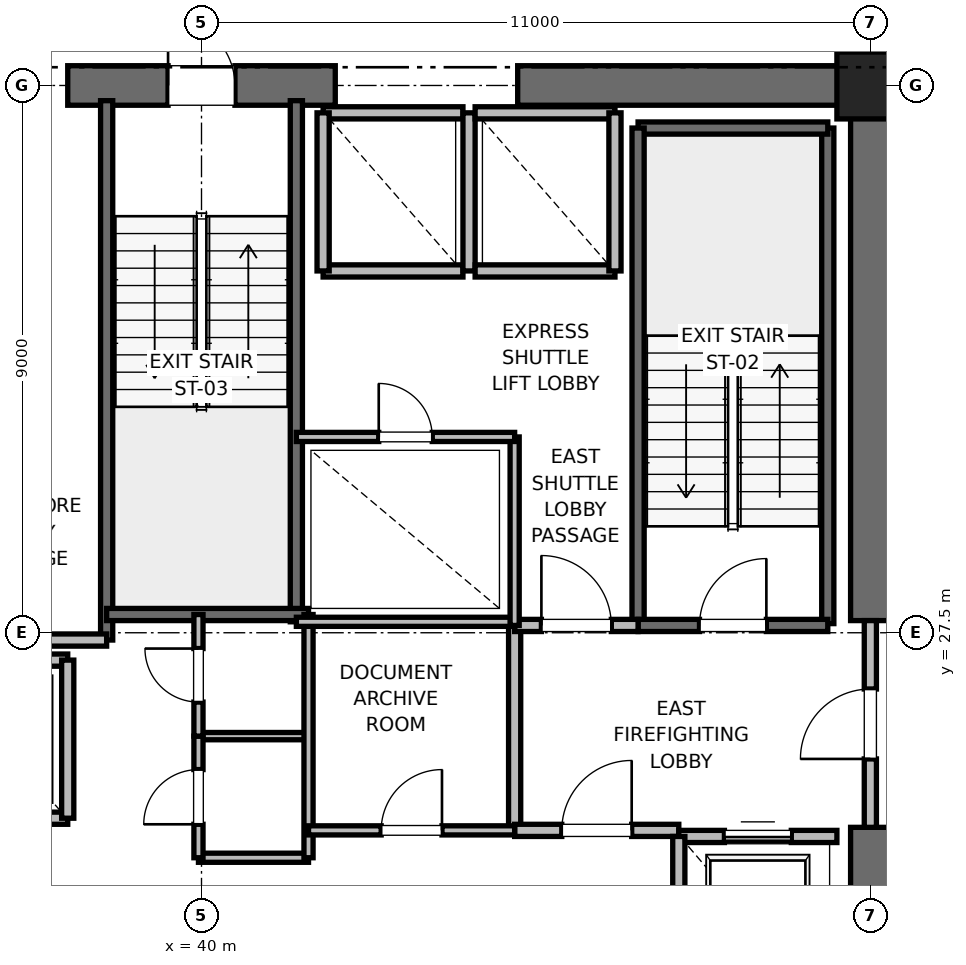
"""IFC4 building model, lengths in metres.
Left out: names, types, materials, properties, quantities, classifications, styles, units other than length and angle.
Written with IfcOpenShell. Run it as: python <this file> out.ifc"""

import sys

from ifc_helpers import new_model, si_unit, direction, frame, frame_2d, origin, origin_2d, place, context, subcontext, project, spatial, rectangle, extrude, element, fill, save


model = new_model("IFC4")
c1 = context("Model", 3, precision=1e-05, world=origin(), true_north=direction((0.0, 1.0)))
c2 = subcontext(c1, "Body", "Model", "MODEL_VIEW")
j1 = project(units=[si_unit("LENGTHUNIT", "METRE"), si_unit("PLANEANGLEUNIT", "RADIAN")], contexts=[c1])
p1 = place(None, origin())
s1 = spatial("IfcSite", under=j1, at=p1, CompositionType="ELEMENT")
p2 = place(p1, origin())
s2 = spatial("IfcBuilding", under=s1, at=p2, CompositionType="ELEMENT")
p3 = place(p2, frame((0.0, 0.0, 79.6)))
s3 = spatial("IfcBuildingStorey", under=s2, at=p3, CompositionType="ELEMENT", Elevation=79.6)
p4 = place(p3, frame((51.0, 36.5, 0.0), z_axis=(0.0, 0.0, 1.0), x_axis=(1.0, 0.0, 0.0)))
e1 = element("IfcColumn", 1, at=p4, inside=s3, PredefinedType="PILASTER", context=c2, shape_type="SweptSolid", body=[
    extrude(rectangle(XDim=1.1, YDim=1.1, at=origin_2d()), origin(), (0.0, 0.0, 1.0), 4.0),
])
p5 = place(p3, frame((37.8, 36.5, 0.0), z_axis=(0.0, 0.0, 1.0), x_axis=(1.0, 0.0, 0.0)))
e2 = element("IfcWall", 2, at=p5, inside=s3, PredefinedType="SHEAR", context=c2, shape_type="SweptSolid", body=[
    extrude(rectangle(XDim=4.4, YDim=0.65, at=frame_2d((2.2, 0.0))), origin(), (0.0, 0.0, 1.0), 3.76),
])
p6 = place(p5, frame((1.65, 0.0, 0.0)))
e3 = element("IfcOpeningElement", 3, at=p6, cuts=e2, PredefinedType="OPENING", context=c2, shape_type="SweptSolid", body=[
    extrude(rectangle(XDim=1.1, YDim=2.15, at=frame_2d((0.55, 1.075))), frame((0.0, 0.325, 0.0), z_axis=(0.0, -1.0, 0.0), x_axis=(1.0, 0.0, 0.0)), (0.0, 0.0, 1.0), 0.65),
])
for number, where, z_axis, x_axis in (
    (4, (45.2, 36.5, 0.0), (0.0, 0.0, 1.0), (1.0, 0.0, 0.0)),
    (5, (51.0, 18.5, 0.0), (0.0, 0.0, 1.0), (0.0, 1.0, 0.0)),
):
    element("IfcWall", number, at=place(p3, frame(where, z_axis=z_axis, x_axis=x_axis)), inside=s3, PredefinedType="SHEAR", context=c2, shape_type="SweptSolid", body=[
        extrude(rectangle(XDim=5.8, YDim=0.65, at=frame_2d((2.9, 0.0))), origin(), (0.0, 0.0, 1.0), 3.76),
    ])
p7 = place(p3, frame((51.0, 27.7, 0.0), z_axis=(0.0, 0.0, 1.0), x_axis=(0.0, 1.0, 0.0)))
e6 = element("IfcWall", 6, at=p7, inside=s3, PredefinedType="SHEAR", context=c2, shape_type="SweptSolid", body=[
    extrude(rectangle(XDim=8.8, YDim=0.65, at=frame_2d((4.4, 0.0))), origin(), (0.0, 0.0, 1.0), 3.76),
])
p8 = place(p3, frame((50.3, 27.65, 0.0), z_axis=(0.0, 0.0, 1.0), x_axis=(0.0, 1.0, 0.0)))
e7 = element("IfcWall", 7, at=p8, inside=s3, PredefinedType="SOLIDWALL", context=c2, shape_type="SweptSolid", body=[
    extrude(rectangle(XDim=8.15, YDim=0.2, at=frame_2d((4.075, 0.0))), origin(), (0.0, 0.0, 1.0), 3.76),
])
p9 = place(p3, frame((47.18, 35.8, 0.0), z_axis=(0.0, 0.0, 1.0), x_axis=(1.0, 0.0, 0.0)))
e8 = element("IfcWall", 8, at=p9, inside=s3, PredefinedType="SOLIDWALL", context=c2, shape_type="SweptSolid", body=[
    extrude(rectangle(XDim=3.12, YDim=0.2, at=frame_2d((1.56, 0.0))), origin(), (0.0, 0.0, 1.0), 3.76),
])
p10 = place(p3, frame((47.18, 27.62, 0.0), z_axis=(0.0, 0.0, 1.0), x_axis=(0.0, 1.0, 0.0)))
e9 = element("IfcWall", 9, at=p10, inside=s3, PredefinedType="SOLIDWALL", context=c2, shape_type="SweptSolid", body=[
    extrude(rectangle(XDim=8.18, YDim=0.2, at=frame_2d((4.09, 0.0))), origin(), (0.0, 0.0, 1.0), 3.76),
])
p11 = place(p3, frame((47.18, 27.62, 0.0), z_axis=(0.0, 0.0, 1.0), x_axis=(1.0, 0.0, 0.0)))
e10 = element("IfcWall", 10, at=p11, inside=s3, PredefinedType="SOLIDWALL", context=c2, shape_type="SweptSolid", body=[
    extrude(rectangle(XDim=3.12, YDim=0.2, at=frame_2d((1.56, 0.0))), origin(), (0.0, 0.0, 1.0), 3.76),
])
p12 = place(p11, frame((1.01, 0.0, 0.0)))
e11 = element("IfcOpeningElement", 11, at=p12, cuts=e10, PredefinedType="OPENING", context=c2, shape_type="SweptSolid", body=[
    extrude(rectangle(XDim=1.1, YDim=2.15, at=frame_2d((0.55, 1.075))), frame((0.0, 0.1, 0.0), z_axis=(0.0, -1.0, 0.0), x_axis=(1.0, 0.0, 0.0)), (0.0, 0.0, 1.0), 0.2),
])
p13 = place(p3, frame((38.44, 27.38, 0.0), z_axis=(0.0, 0.0, 1.0), x_axis=(0.0, 1.0, 0.0)))
e12 = element("IfcWall", 12, at=p13, inside=s3, PredefinedType="SOLIDWALL", context=c2, shape_type="SweptSolid", body=[
    extrude(rectangle(XDim=8.87, YDim=0.2, at=frame_2d((4.435, 0.0))), origin(), (0.0, 0.0, 1.0), 3.76),
])
p14 = place(p3, frame((41.56, 27.68, 0.0), z_axis=(0.0, 0.0, 1.0), x_axis=(0.0, 1.0, 0.0)))
e13 = element("IfcWall", 13, at=p14, inside=s3, PredefinedType="SOLIDWALL", context=c2, shape_type="SweptSolid", body=[
    extrude(rectangle(XDim=8.57, YDim=0.2, at=frame_2d((4.285, 0.0))), origin(), (0.0, 0.0, 1.0), 3.76),
])
p15 = place(p3, frame((38.44, 27.8, 0.0), z_axis=(0.0, 0.0, 1.0), x_axis=(1.0, 0.0, 0.0)))
e14 = element("IfcWall", 14, at=p15, inside=s3, PredefinedType="SOLIDWALL", context=c2, shape_type="SweptSolid", body=[
    extrude(rectangle(XDim=3.32, YDim=0.2, at=frame_2d((1.66, 0.0))), origin(), (0.0, 0.0, 1.0), 3.76),
])
p16 = place(p3, frame((32.82, 27.38, 0.0), z_axis=(0.0, 0.0, 1.0), x_axis=(1.0, 0.0, 0.0)))
e15 = element("IfcWall", 15, at=p16, inside=s3, PredefinedType="PARTITIONING", context=c2, shape_type="SweptSolid", body=[
    extrude(rectangle(XDim=5.62, YDim=0.2, at=frame_2d((2.81, 0.0))), origin(), (0.0, 0.0, 1.0), 3.76),
])
p17 = place(p3, frame((45.15, 24.25, 0.0), z_axis=(0.0, 0.0, 1.0), x_axis=(0.0, 1.0, 0.0)))
e16 = element("IfcWall", 16, at=p17, inside=s3, PredefinedType="PARTITIONING", context=c2, shape_type="SweptSolid", body=[
    extrude(rectangle(XDim=3.37, YDim=0.2, at=frame_2d((1.685, 0.0))), origin(), (0.0, 0.0, 1.0), 3.76),
])
p18 = place(p3, frame((45.15, 24.25, 0.0), z_axis=(0.0, 0.0, 1.0), x_axis=(1.0, 0.0, 0.0)))
e17 = element("IfcWall", 17, at=p18, inside=s3, PredefinedType="PARTITIONING", context=c2, shape_type="SweptSolid", body=[
    extrude(rectangle(XDim=2.7, YDim=0.2, at=frame_2d((1.35, 0.0))), origin(), (0.0, 0.0, 1.0), 3.76),
])
p19 = place(p18, frame((0.775, 0.0, 0.0)))
e18 = element("IfcOpeningElement", 18, at=p19, cuts=e17, PredefinedType="OPENING", context=c2, shape_type="SweptSolid", body=[
    extrude(rectangle(XDim=1.15, YDim=2.2, at=frame_2d((0.575, 1.1))), frame((0.0, 0.1, 0.0), z_axis=(0.0, -1.0, 0.0), x_axis=(1.0, 0.0, 0.0)), (0.0, 0.0, 1.0), 0.2),
])
p20 = place(p3, frame((45.15, 27.62, 0.0), z_axis=(0.0, 0.0, 1.0), x_axis=(1.0, 0.0, 0.0)))
e19 = element("IfcWall", 19, at=p20, inside=s3, PredefinedType="PARTITIONING", context=c2, shape_type="SweptSolid", body=[
    extrude(rectangle(XDim=2.03, YDim=0.2, at=frame_2d((1.015, 0.0))), origin(), (0.0, 0.0, 1.0), 3.76),
])
p21 = place(p20, frame((0.44, 0.0, 0.0)))
e20 = element("IfcOpeningElement", 20, at=p21, cuts=e19, PredefinedType="OPENING", context=c2, shape_type="SweptSolid", body=[
    extrude(rectangle(XDim=1.15, YDim=2.2, at=frame_2d((0.575, 1.1))), frame((0.0, 0.1, 0.0), z_axis=(0.0, -1.0, 0.0), x_axis=(1.0, 0.0, 0.0)), (0.0, 0.0, 1.0), 0.2),
])
p22 = place(p3, frame((51.0, 24.3, 0.0), z_axis=(0.0, 0.0, 1.0), x_axis=(0.0, 1.0, 0.0)))
e21 = element("IfcWall", 21, at=p22, inside=s3, PredefinedType="PARTITIONING", context=c2, shape_type="SweptSolid", body=[
    extrude(rectangle(XDim=3.4, YDim=0.2, at=frame_2d((1.7, 0.0))), origin(), (0.0, 0.0, 1.0), 2.54),
])
p23 = place(p22, frame((1.125, 0.0, 0.0)))
e22 = element("IfcOpeningElement", 22, at=p23, cuts=e21, PredefinedType="OPENING", context=c2, shape_type="SweptSolid", body=[
    extrude(rectangle(XDim=1.15, YDim=2.2, at=frame_2d((0.575, 1.1))), frame((0.0, 0.1, 0.0), z_axis=(0.0, -1.0, 0.0), x_axis=(1.0, 0.0, 0.0)), (0.0, 0.0, 1.0), 0.2),
])
p24 = place(p3, frame((50.45, 24.15, 0.0), z_axis=(0.0, 0.0, 1.0), x_axis=(-1.0, 0.0, 0.0)))
e23 = element("IfcWall", 23, at=p24, inside=s3, PredefinedType="SOLIDWALL", context=c2, shape_type="SweptSolid", body=[
    extrude(rectangle(XDim=2.6, YDim=0.2, at=frame_2d((1.3, 0.0))), origin(), (0.0, 0.0, 1.0), 2.54),
])
p25 = place(p24, frame((0.75, 0.0, 0.0)))
e24 = element("IfcOpeningElement", 24, at=p25, cuts=e23, PredefinedType="OPENING", context=c2, shape_type="SweptSolid", body=[
    extrude(rectangle(XDim=1.1, YDim=2.2, at=frame_2d((0.55, 1.1))), frame((0.0, 0.1, 0.0), z_axis=(0.0, -1.0, 0.0), x_axis=(1.0, 0.0, 0.0)), (0.0, 0.0, 1.0), 0.2),
])
p26 = place(p3, frame((47.85, 24.15, 0.0), z_axis=(0.0, 0.0, 1.0), x_axis=(0.0, -1.0, 0.0)))
e25 = element("IfcWall", 25, at=p26, inside=s3, PredefinedType="SOLIDWALL", context=c2, shape_type="SweptSolid", body=[
    extrude(rectangle(XDim=3.0, YDim=0.2, at=frame_2d((1.5, 0.0))), origin(), (0.0, 0.0, 1.0), 3.76),
])
p27 = place(p3, frame((35.5, 24.45, 0.0), z_axis=(0.0, 0.0, 1.0), x_axis=(1.0, 0.0, 0.0)))
e26 = element("IfcWall", 26, at=p27, inside=s3, PredefinedType="SOLIDWALL", context=c2, shape_type="SweptSolid", body=[
    extrude(rectangle(XDim=2.3, YDim=0.2, at=frame_2d((1.15, 0.0))), origin(), (0.0, 0.0, 1.0), 3.76),
])
p28 = place(p27, frame((0.6, 0.0, 0.0)))
e27 = element("IfcOpeningElement", 27, at=p28, cuts=e26, PredefinedType="OPENING", context=c2, shape_type="SweptSolid", body=[
    extrude(rectangle(XDim=1.1, YDim=2.2, at=frame_2d((0.55, 1.1))), frame((0.0, 0.1, 0.0), z_axis=(0.0, -1.0, 0.0), x_axis=(1.0, 0.0, 0.0)), (0.0, 0.0, 1.0), 0.2),
])
p29 = place(p3, frame((37.8, 27.05, 0.0), z_axis=(0.0, 0.0, 1.0), x_axis=(-1.0, 0.0, 0.0)))
e28 = element("IfcWall", 28, at=p29, inside=s3, PredefinedType="SOLIDWALL", context=c2, shape_type="SweptSolid", body=[
    extrude(rectangle(XDim=2.3, YDim=0.2, at=frame_2d((1.15, 0.0))), origin(), (0.0, 0.0, 1.0), 3.76),
])
p30 = place(p3, frame((37.8, 24.45, 0.0), z_axis=(0.0, 0.0, 1.0), x_axis=(0.0, 1.0, 0.0)))
e29 = element("IfcWall", 29, at=p30, inside=s3, PredefinedType="SOLIDWALL", context=c2, shape_type="SweptSolid", body=[
    extrude(rectangle(XDim=2.6, YDim=0.2, at=frame_2d((1.3, 0.0))), origin(), (0.0, 0.0, 1.0), 3.76),
])
p31 = place(p3, frame((42.0, 33.45, 0.0), z_axis=(0.0, 0.0, 1.0), x_axis=(1.0, 0.0, 0.0)))
e30 = element("IfcWall", 30, at=p31, inside=s3, PredefinedType="SOLIDWALL", context=c2, shape_type="SweptSolid", body=[
    extrude(rectangle(XDim=2.3, YDim=0.2, at=frame_2d((1.15, 0.0))), origin(), (0.0, 0.0, 1.0), 3.76),
])
p32 = place(p3, frame((44.3, 36.05, 0.0), z_axis=(0.0, 0.0, 1.0), x_axis=(-1.0, 0.0, 0.0)))
e31 = element("IfcWall", 31, at=p32, inside=s3, PredefinedType="SOLIDWALL", context=c2, shape_type="SweptSolid", body=[
    extrude(rectangle(XDim=2.3, YDim=0.2, at=frame_2d((1.15, 0.0))), origin(), (0.0, 0.0, 1.0), 2.54),
])
for number, where, z_axis, x_axis in (
    (32, (42.0, 36.05, 0.0), (0.0, 0.0, 1.0), (0.0, -1.0, 0.0)),
    (33, (44.4, 33.45, 0.0), (0.0, 0.0, 1.0), (0.0, 1.0, 0.0)),
):
    element("IfcWall", number, at=place(p3, frame(where, z_axis=z_axis, x_axis=x_axis)), inside=s3, PredefinedType="SOLIDWALL", context=c2, shape_type="SweptSolid", body=[
        extrude(rectangle(XDim=2.6, YDim=0.2, at=frame_2d((1.3, 0.0))), origin(), (0.0, 0.0, 1.0), 2.54),
    ])
p33 = place(p3, frame((44.5, 33.45, 0.0), z_axis=(0.0, 0.0, 1.0), x_axis=(1.0, 0.0, 0.0)))
e34 = element("IfcWall", 34, at=p33, inside=s3, PredefinedType="SOLIDWALL", context=c2, shape_type="SweptSolid", body=[
    extrude(rectangle(XDim=2.3, YDim=0.2, at=frame_2d((1.15, 0.0))), origin(), (0.0, 0.0, 1.0), 3.76),
])
p34 = place(p3, frame((46.8, 36.05, 0.0), z_axis=(0.0, 0.0, 1.0), x_axis=(-1.0, 0.0, 0.0)))
e35 = element("IfcWall", 35, at=p34, inside=s3, PredefinedType="SOLIDWALL", context=c2, shape_type="SweptSolid", body=[
    extrude(rectangle(XDim=2.3, YDim=0.2, at=frame_2d((1.15, 0.0))), origin(), (0.0, 0.0, 1.0), 2.54),
])
p35 = place(p3, frame((46.8, 33.45, 0.0), z_axis=(0.0, 0.0, 1.0), x_axis=(0.0, 1.0, 0.0)))
e36 = element("IfcWall", 36, at=p35, inside=s3, PredefinedType="SOLIDWALL", context=c2, shape_type="SweptSolid", body=[
    extrude(rectangle(XDim=2.6, YDim=0.2, at=frame_2d((1.3, 0.0))), origin(), (0.0, 0.0, 1.0), 3.76),
])
p36 = place(p3, frame((39.95, 23.8, 0.0), z_axis=(0.0, 0.0, 1.0), x_axis=(1.0, 0.0, 0.0)))
e37 = element("IfcWall", 37, at=p36, inside=s3, PredefinedType="PARTITIONING", context=c2, shape_type="SweptSolid", body=[
    extrude(rectangle(XDim=1.81, YDim=0.15, at=frame_2d((0.905, 0.0))), origin(), (0.0, 0.0, 1.0), 2.85),
])
p37 = place(p3, frame((39.95, 25.8, 0.0), z_axis=(0.0, 0.0, 1.0), x_axis=(1.0, 0.0, 0.0)))
e38 = element("IfcWall", 38, at=p37, inside=s3, PredefinedType="PARTITIONING", context=c2, shape_type="SweptSolid", body=[
    extrude(rectangle(XDim=1.81, YDim=0.12, at=frame_2d((0.905, 0.0))), origin(), (0.0, 0.0, 1.0), 2.85),
])
p38 = place(p3, frame((41.76, 23.8, 0.0), z_axis=(0.0, 0.0, 1.0), x_axis=(0.0, 1.0, 0.0)))
e39 = element("IfcWall", 39, at=p38, inside=s3, PredefinedType="PARTITIONING", context=c2, shape_type="SweptSolid", body=[
    extrude(rectangle(XDim=4.0, YDim=0.15, at=frame_2d((2.0, 0.0))), origin(), (0.0, 0.0, 1.0), 2.85),
])
p39 = place(p3, frame((39.95, 23.8, 0.0), z_axis=(0.0, 0.0, 1.0), x_axis=(0.0, 1.0, 0.0)))
e40 = element("IfcWall", 40, at=p39, inside=s3, PredefinedType="PARTITIONING", context=c2, shape_type="SweptSolid", body=[
    extrude(rectangle(XDim=2.0, YDim=0.15, at=frame_2d((1.0, 0.0))), origin(), (0.0, 0.0, 1.0), 2.85),
])
p40 = place(p39, frame((0.55, 0.0, 0.0)))
e41 = element("IfcOpeningElement", 41, at=p40, cuts=e40, PredefinedType="OPENING", context=c2, shape_type="SweptSolid", body=[
    extrude(rectangle(XDim=0.9, YDim=2.1, at=frame_2d((0.45, 1.05))), frame((0.0, 0.075, 0.0), z_axis=(0.0, -1.0, 0.0), x_axis=(1.0, 0.0, 0.0)), (0.0, 0.0, 1.0), 0.15),
])
p41 = place(p3, frame((39.95, 25.8, 0.0), z_axis=(0.0, 0.0, 1.0), x_axis=(0.0, 1.0, 0.0)))
e42 = element("IfcWall", 42, at=p41, inside=s3, PredefinedType="PARTITIONING", context=c2, shape_type="SweptSolid", body=[
    extrude(rectangle(XDim=2.0, YDim=0.15, at=frame_2d((1.0, 0.0))), origin(), (0.0, 0.0, 1.0), 2.85),
])
p42 = place(p41, frame((0.56, 0.0, 0.0)))
e43 = element("IfcOpeningElement", 43, at=p42, cuts=e42, PredefinedType="OPENING", context=c2, shape_type="SweptSolid", body=[
    extrude(rectangle(XDim=0.88, YDim=2.1, at=frame_2d((0.44, 1.05))), frame((0.0, 0.075, 0.0), z_axis=(0.0, -1.0, 0.0), x_axis=(1.0, 0.0, 0.0)), (0.0, 0.0, 1.0), 0.15),
])
p43 = place(p3, frame((41.56, 27.68, 0.0), z_axis=(0.0, 0.0, 1.0), x_axis=(1.0, 0.0, 0.0)))
e44 = element("IfcWall", 44, at=p43, inside=s3, PredefinedType="PARTITIONING", context=c2, shape_type="SweptSolid", body=[
    extrude(rectangle(XDim=3.59, YDim=0.15, at=frame_2d((1.795, 0.0))), origin(), (0.0, 0.0, 1.0), 2.85),
])
p44 = place(p3, frame((41.76, 24.25, 0.0), z_axis=(0.0, 0.0, 1.0), x_axis=(1.0, 0.0, 0.0)))
e45 = element("IfcWall", 45, at=p44, inside=s3, PredefinedType="PARTITIONING", context=c2, shape_type="SweptSolid", body=[
    extrude(rectangle(XDim=3.39, YDim=0.15, at=frame_2d((1.695, 0.0))), origin(), (0.0, 0.0, 1.0), 2.85),
])
p45 = place(p44, frame((1.195, 0.0, 0.0)))
e46 = element("IfcOpeningElement", 46, at=p45, cuts=e45, PredefinedType="OPENING", context=c2, shape_type="SweptSolid", body=[
    extrude(rectangle(XDim=1.0, YDim=2.15, at=frame_2d((0.5, 1.075))), frame((0.0, 0.075, 0.0), z_axis=(0.0, -1.0, 0.0), x_axis=(1.0, 0.0, 0.0)), (0.0, 0.0, 1.0), 0.15),
])
p46 = place(p3, frame((45.15, 27.62, 0.0), z_axis=(0.0, 0.0, 1.0), x_axis=(0.0, 1.0, 0.0)))
e47 = element("IfcWall", 47, at=p46, inside=s3, PredefinedType="PARTITIONING", context=c2, shape_type="SweptSolid", body=[
    extrude(rectangle(XDim=3.1, YDim=0.15, at=frame_2d((1.55, 0.0))), origin(), (0.0, 0.0, 1.0), 2.85),
])
p47 = place(p3, frame((41.56, 30.72, 0.0), z_axis=(0.0, 0.0, 1.0), x_axis=(1.0, 0.0, 0.0)))
e48 = element("IfcWall", 48, at=p47, inside=s3, PredefinedType="PARTITIONING", context=c2, shape_type="SweptSolid", body=[
    extrude(rectangle(XDim=3.59, YDim=0.15, at=frame_2d((1.795, 0.0))), origin(), (0.0, 0.0, 1.0), 2.85),
])
p48 = place(p47, frame((1.355, 0.0, 0.0)))
e49 = element("IfcOpeningElement", 49, at=p48, cuts=e48, PredefinedType="OPENING", context=c2, shape_type="SweptSolid", body=[
    extrude(rectangle(XDim=0.88, YDim=2.1, at=frame_2d((0.44, 1.05))), frame((0.0, 0.075, 0.0), z_axis=(0.0, -1.0, 0.0), x_axis=(1.0, 0.0, 0.0)), (0.0, 0.0, 1.0), 0.15),
])
p49 = place(p12, origin())
e50 = element("IfcDoor", 50, at=p49, inside=s3, OperationType="SINGLE_SWING_RIGHT", PredefinedType="DOOR", context=c2, shape_type="SweptSolid", body=[
    extrude(rectangle(XDim=1.1, YDim=2.15, at=frame_2d((0.55, 1.075))), frame((0.0, 0.025, 0.0), z_axis=(0.0, -1.0, 0.0), x_axis=(1.0, 0.0, 0.0)), (0.0, 0.0, 1.0), 0.05),
])
fill(e11, e50)
p50 = place(p6, origin())
e51 = element("IfcDoor", 51, at=p50, inside=s3, OperationType="SINGLE_SWING_LEFT", PredefinedType="DOOR", context=c2, shape_type="SweptSolid", body=[
    extrude(rectangle(XDim=1.1, YDim=2.15, at=frame_2d((0.55, 1.075))), frame((0.0, 0.025, 0.0), z_axis=(0.0, -1.0, 0.0), x_axis=(1.0, 0.0, 0.0)), (0.0, 0.0, 1.0), 0.05),
])
fill(e3, e51)
p51 = place(p19, origin())
e52 = element("IfcDoor", 52, at=p51, inside=s3, OperationType="SINGLE_SWING_RIGHT", PredefinedType="DOOR", context=c2, shape_type="SweptSolid", body=[
    extrude(rectangle(XDim=1.15, YDim=2.2, at=frame_2d((0.575, 1.1))), frame((0.0, 0.025, 0.0), z_axis=(0.0, -1.0, 0.0), x_axis=(1.0, 0.0, 0.0)), (0.0, 0.0, 1.0), 0.05),
])
fill(e18, e52)
p52 = place(p21, origin())
e53 = element("IfcDoor", 53, at=p52, inside=s3, OperationType="SINGLE_SWING_LEFT", PredefinedType="DOOR", context=c2, shape_type="SweptSolid", body=[
    extrude(rectangle(XDim=1.15, YDim=2.2, at=frame_2d((0.575, 1.1))), frame((0.0, 0.025, 0.0), z_axis=(0.0, -1.0, 0.0), x_axis=(1.0, 0.0, 0.0)), (0.0, 0.0, 1.0), 0.05),
])
fill(e20, e53)
p53 = place(p23, origin())
e54 = element("IfcDoor", 54, at=p53, inside=s3, OperationType="SINGLE_SWING_LEFT", PredefinedType="DOOR", context=c2, shape_type="SweptSolid", body=[
    extrude(rectangle(XDim=1.15, YDim=2.2, at=frame_2d((0.575, 1.1))), frame((0.0, 0.025, 0.0), z_axis=(0.0, -1.0, 0.0), x_axis=(1.0, 0.0, 0.0)), (0.0, 0.0, 1.0), 0.05),
])
fill(e22, e54)
p54 = place(p25, origin())
e55 = element("IfcDoor", 55, at=p54, inside=s3, OperationType="SLIDING_TO_RIGHT", PredefinedType="DOOR", context=c2, shape_type="SweptSolid", body=[
    extrude(rectangle(XDim=1.1, YDim=2.2, at=frame_2d((0.55, 1.1))), frame((0.0, 0.025, 0.0), z_axis=(0.0, -1.0, 0.0), x_axis=(1.0, 0.0, 0.0)), (0.0, 0.0, 1.0), 0.05),
])
fill(e24, e55)
p55 = place(p40, origin())
e56 = element("IfcDoor", 56, at=p55, inside=s3, OperationType="SINGLE_SWING_LEFT", PredefinedType="DOOR", context=c2, shape_type="SweptSolid", body=[
    extrude(rectangle(XDim=0.9, YDim=2.1, at=frame_2d((0.45, 1.05))), frame((0.0, 0.025, 0.0), z_axis=(0.0, -1.0, 0.0), x_axis=(1.0, 0.0, 0.0)), (0.0, 0.0, 1.0), 0.05),
])
fill(e41, e56)
p56 = place(p42, origin())
e57 = element("IfcDoor", 57, at=p56, inside=s3, OperationType="SINGLE_SWING_RIGHT", PredefinedType="DOOR", context=c2, shape_type="SweptSolid", body=[
    extrude(rectangle(XDim=0.88, YDim=2.1, at=frame_2d((0.44, 1.05))), frame((0.0, 0.025, 0.0), z_axis=(0.0, -1.0, 0.0), x_axis=(1.0, 0.0, 0.0)), (0.0, 0.0, 1.0), 0.05),
])
fill(e43, e57)
p57 = place(p45, origin())
e58 = element("IfcDoor", 58, at=p57, inside=s3, OperationType="SINGLE_SWING_RIGHT", PredefinedType="DOOR", context=c2, shape_type="SweptSolid", body=[
    extrude(rectangle(XDim=1.0, YDim=2.15, at=frame_2d((0.5, 1.075))), frame((0.0, 0.025, 0.0), z_axis=(0.0, -1.0, 0.0), x_axis=(1.0, 0.0, 0.0)), (0.0, 0.0, 1.0), 0.05),
])
fill(e46, e58)
p58 = place(p48, origin())
e59 = element("IfcDoor", 59, at=p58, inside=s3, OperationType="SINGLE_SWING_LEFT", PredefinedType="DOOR", context=c2, shape_type="SweptSolid", body=[
    extrude(rectangle(XDim=0.88, YDim=2.1, at=frame_2d((0.44, 1.05))), frame((0.0, 0.025, 0.0), z_axis=(0.0, -1.0, 0.0), x_axis=(1.0, 0.0, 0.0)), (0.0, 0.0, 1.0), 0.05),
])
fill(e49, e59)
save(model, sys.argv[1])
